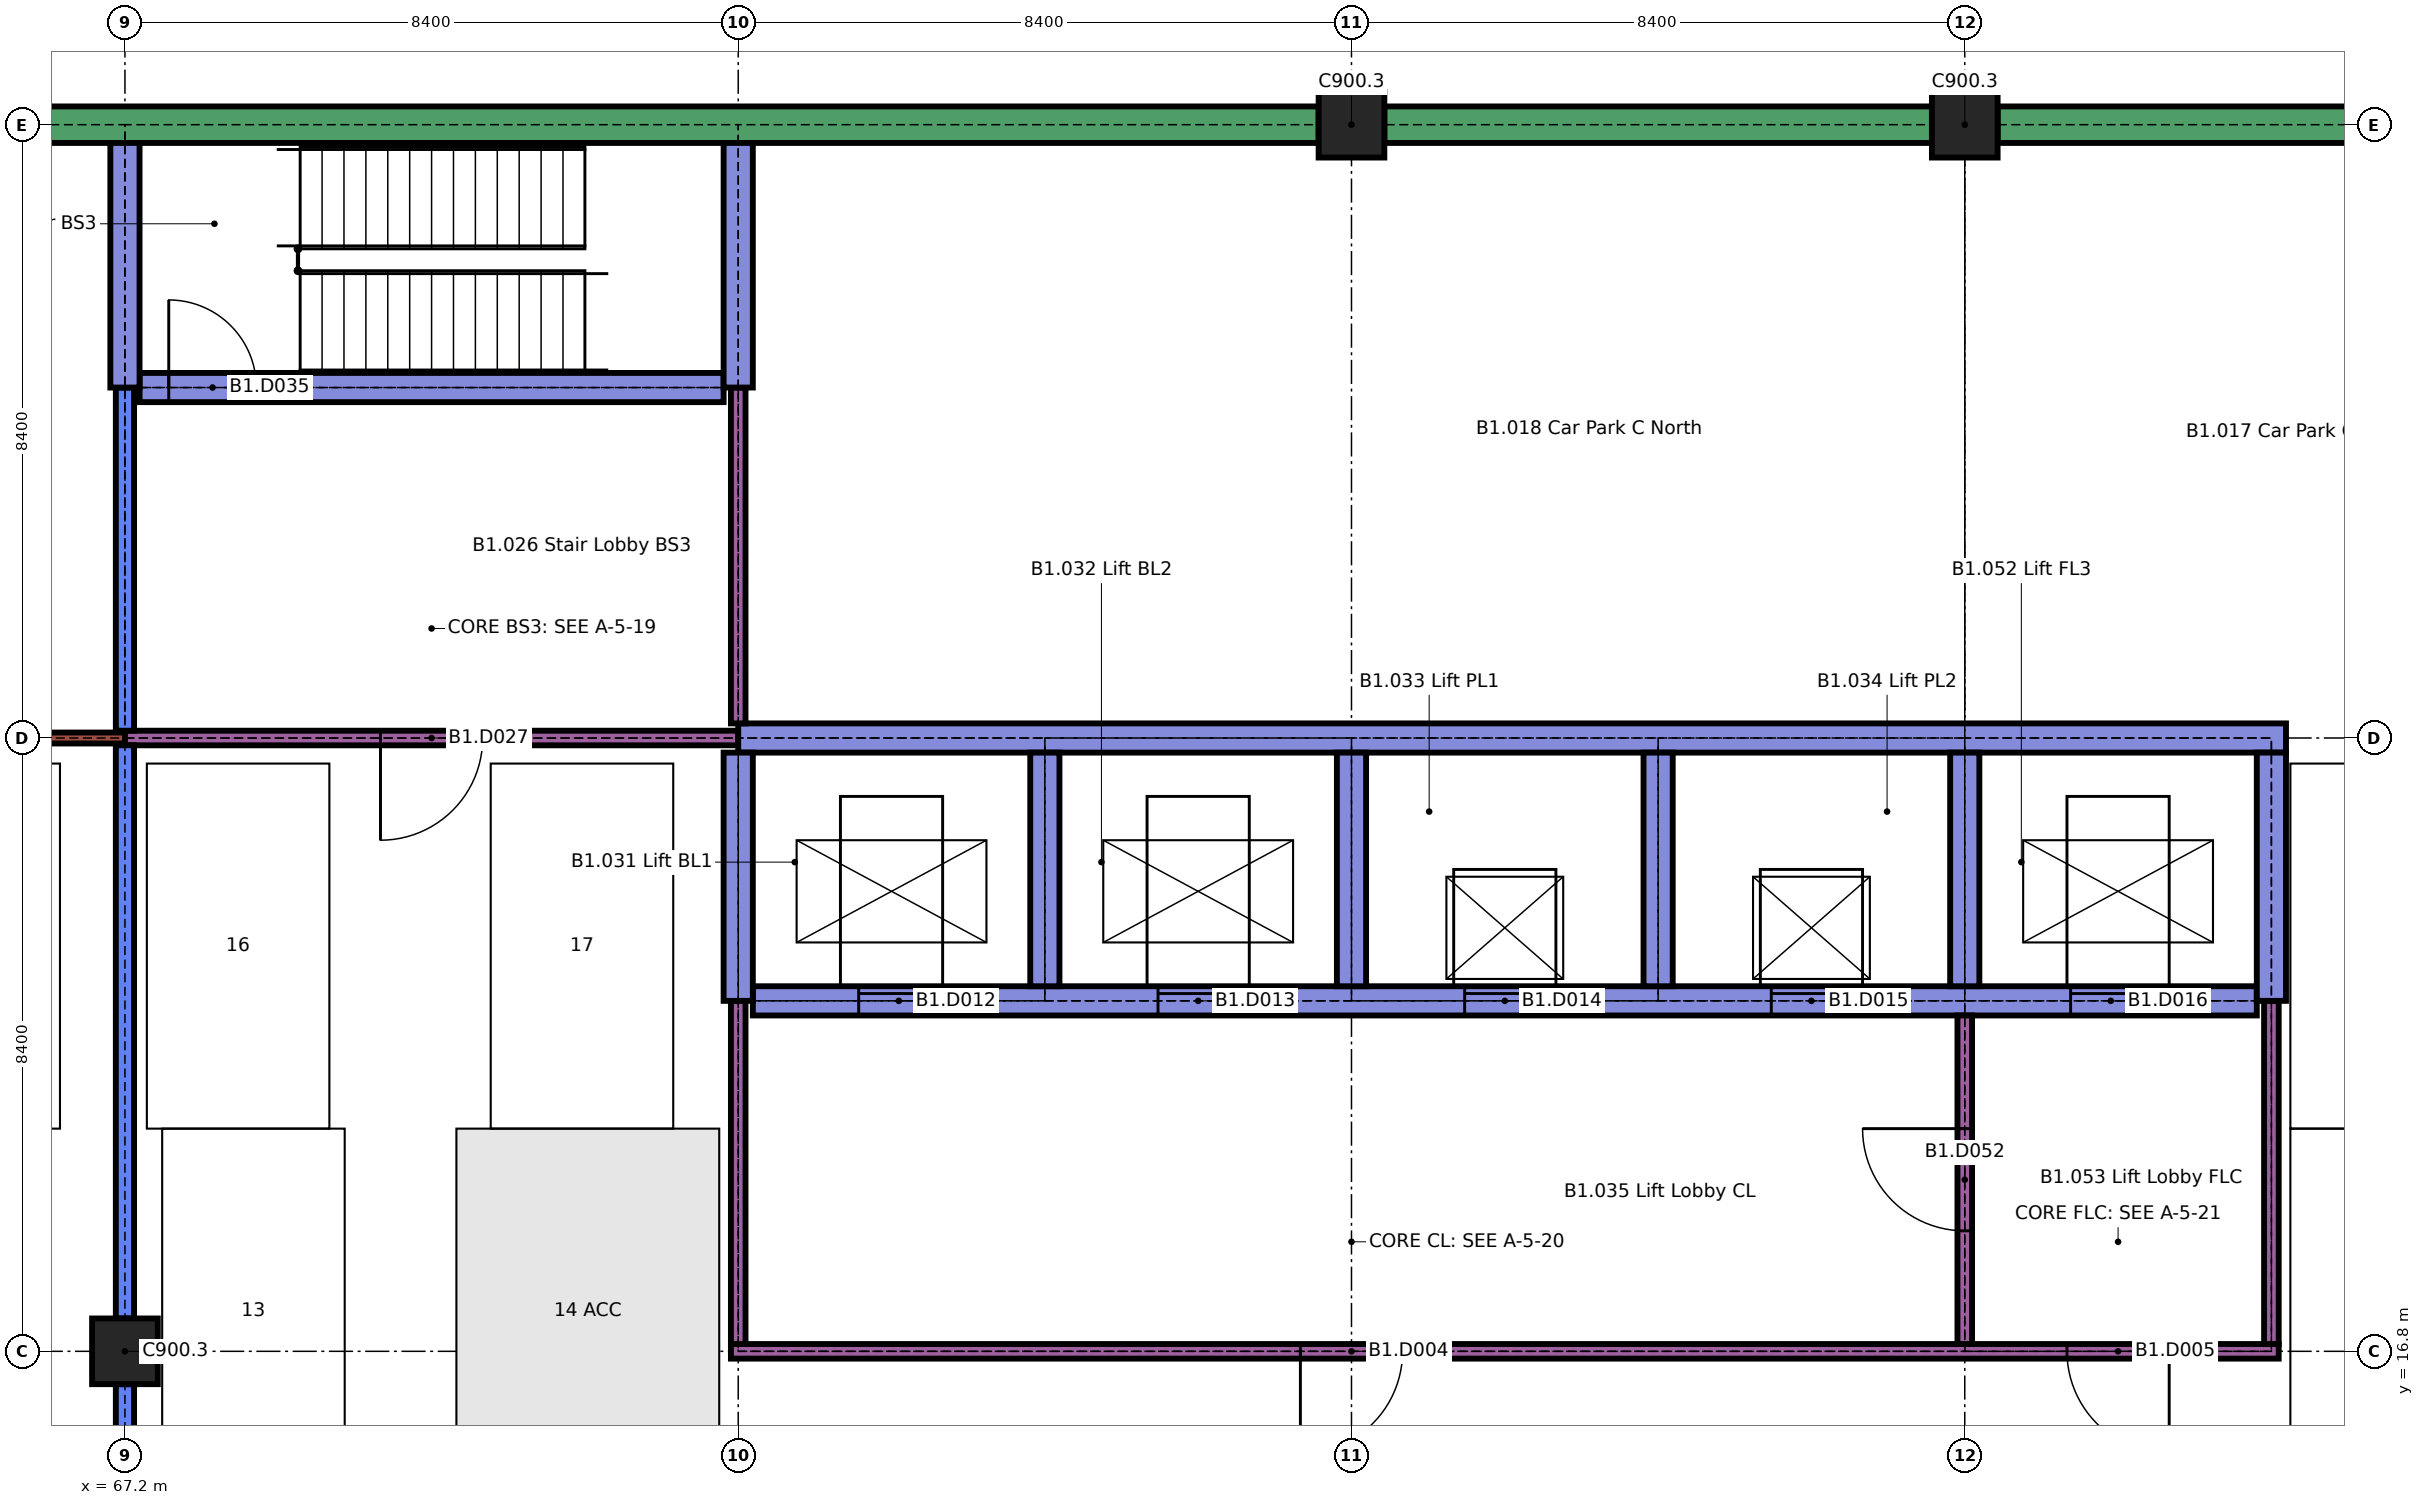
"""IFC4 building model, lengths in metres.
Left out: names, types, materials, properties, quantities, classifications, styles, units other than length and angle.
Written with IfcOpenShell. Run it as: python <this file> out.ifc"""

import sys

from ifc_helpers import new_model, si_unit, direction, frame, frame_2d, origin, origin_2d, place, context, subcontext, project, spatial, rectangle, extrude, element, fill, save


model = new_model("IFC4")
c1 = context("Model", 3, precision=1e-05, world=origin(), true_north=direction((0.0, 1.0)))
c2 = subcontext(c1, "Body", "Model", "MODEL_VIEW")
j1 = project(units=[si_unit("LENGTHUNIT", "METRE"), si_unit("PLANEANGLEUNIT", "RADIAN")], contexts=[c1])
p1 = place(None, origin())
s1 = spatial("IfcSite", under=j1, at=p1, CompositionType="ELEMENT")
p2 = place(p1, origin())
s2 = spatial("IfcBuilding", under=s1, at=p2, CompositionType="ELEMENT")
p3 = place(p2, frame((0.0, 0.0, -4.2)))
s3 = spatial("IfcBuildingStorey", under=s2, at=p3, CompositionType="ELEMENT", Elevation=-4.2)
for number, where, z_axis, x_axis in (
    (1, (67.2, 16.8, 0.0), (0.0, 0.0, 1.0), (1.0, 0.0, 0.0)),
    (2, (84.0, 33.6, 0.0), (0.0, 0.0, 1.0), (1.0, 0.0, 0.0)),
    (3, (92.4, 33.6, 0.0), (0.0, 0.0, 1.0), (1.0, 0.0, 0.0)),
):
    element("IfcColumn", number, at=place(p3, frame(where, z_axis=z_axis, x_axis=x_axis)), inside=s3, PredefinedType="COLUMN", context=c2, shape_type="SweptSolid", body=[
        extrude(rectangle(XDim=0.9, YDim=0.9, at=origin_2d()), origin(), (0.0, 0.0, 1.0), 3.75),
    ])
p4 = place(p3, frame((42.45, 33.6, 0.0), z_axis=(0.0, 0.0, 1.0), x_axis=(1.0, 0.0, 0.0)))
e4 = element("IfcWall", 4, at=p4, inside=s3, PredefinedType="SOLIDWALL", context=c2, shape_type="SweptSolid", body=[
    extrude(rectangle(XDim=41.1, YDim=0.5, at=frame_2d((20.55, 0.0))), origin(), (0.0, 0.0, 1.0), 3.75),
])
for number, where, z_axis, x_axis in (
    (5, (84.45, 33.6, 0.0), (0.0, 0.0, 1.0), (1.0, 0.0, 0.0)),
    (6, (92.85, 33.6, 0.0), (0.0, 0.0, 1.0), (1.0, 0.0, 0.0)),
):
    element("IfcWall", number, at=place(p3, frame(where, z_axis=z_axis, x_axis=x_axis)), inside=s3, PredefinedType="SOLIDWALL", context=c2, shape_type="SweptSolid", body=[
        extrude(rectangle(XDim=7.5, YDim=0.5, at=frame_2d((3.75, 0.0))), origin(), (0.0, 0.0, 1.0), 3.75),
    ])
p5 = place(p3, frame((75.5, 16.8, 0.0), z_axis=(0.0, 0.0, 1.0), x_axis=(1.0, 0.0, 0.0)))
e7 = element("IfcWall", 7, at=p5, inside=s3, PredefinedType="PARTITIONING", context=c2, shape_type="SweptSolid", body=[
    extrude(rectangle(XDim=21.2, YDim=0.2, at=frame_2d((10.6, 0.0))), origin(), (0.0, 0.0, 1.0), 3.75),
])
p6 = place(p5, frame((7.8, 0.0, 0.0)))
e8 = element("IfcOpeningElement", 8, at=p6, cuts=e7, PredefinedType="OPENING", context=c2, shape_type="SweptSolid", body=[
    extrude(rectangle(XDim=1.4, YDim=2.1, at=frame_2d((0.7, 1.05))), frame((0.0, 0.11, 0.0), z_axis=(0.0, -1.0, 0.0), x_axis=(1.0, 0.0, 0.0)), (0.0, 0.0, 1.0), 0.22),
])
p7 = place(p5, frame((18.3, 0.0, 0.0)))
e9 = element("IfcOpeningElement", 9, at=p7, cuts=e7, PredefinedType="OPENING", context=c2, shape_type="SweptSolid", body=[
    extrude(rectangle(XDim=1.4, YDim=2.1, at=frame_2d((0.7, 1.05))), frame((0.0, 0.11, 0.0), z_axis=(0.0, -1.0, 0.0), x_axis=(1.0, 0.0, 0.0)), (0.0, 0.0, 1.0), 0.22),
])
p8 = place(p3, frame((75.8, 21.6, 0.0), z_axis=(0.0, 0.0, 1.0), x_axis=(1.0, 0.0, 0.0)))
e10 = element("IfcWall", 10, at=p8, inside=s3, PredefinedType="SHEAR", context=c2, shape_type="SweptSolid", body=[
    extrude(rectangle(XDim=20.6, YDim=0.4, at=frame_2d((10.3, 0.0))), origin(), (0.0, 0.0, 1.0), 3.75),
])
p9 = place(p8, frame((1.45, 0.0, 0.0)))
e11 = element("IfcOpeningElement", 11, at=p9, cuts=e10, PredefinedType="OPENING", context=c2, shape_type="SweptSolid", body=[
    extrude(rectangle(XDim=1.1, YDim=2.1, at=frame_2d((0.55, 1.05))), frame((0.0, 0.21, 0.0), z_axis=(0.0, -1.0, 0.0), x_axis=(1.0, 0.0, 0.0)), (0.0, 0.0, 1.0), 0.42),
])
p10 = place(p8, frame((5.55, 0.0, 0.0)))
e12 = element("IfcOpeningElement", 12, at=p10, cuts=e10, PredefinedType="OPENING", context=c2, shape_type="SweptSolid", body=[
    extrude(rectangle(XDim=1.1, YDim=2.1, at=frame_2d((0.55, 1.05))), frame((0.0, 0.21, 0.0), z_axis=(0.0, -1.0, 0.0), x_axis=(1.0, 0.0, 0.0)), (0.0, 0.0, 1.0), 0.42),
])
p11 = place(p8, frame((9.75, 0.0, 0.0)))
e13 = element("IfcOpeningElement", 13, at=p11, cuts=e10, PredefinedType="OPENING", context=c2, shape_type="SweptSolid", body=[
    extrude(rectangle(XDim=1.1, YDim=2.1, at=frame_2d((0.55, 1.05))), frame((0.0, 0.21, 0.0), z_axis=(0.0, -1.0, 0.0), x_axis=(1.0, 0.0, 0.0)), (0.0, 0.0, 1.0), 0.42),
])
p12 = place(p8, frame((13.95, 0.0, 0.0)))
e14 = element("IfcOpeningElement", 14, at=p12, cuts=e10, PredefinedType="OPENING", context=c2, shape_type="SweptSolid", body=[
    extrude(rectangle(XDim=1.1, YDim=2.1, at=frame_2d((0.55, 1.05))), frame((0.0, 0.21, 0.0), z_axis=(0.0, -1.0, 0.0), x_axis=(1.0, 0.0, 0.0)), (0.0, 0.0, 1.0), 0.42),
])
p13 = place(p8, frame((18.05, 0.0, 0.0)))
e15 = element("IfcOpeningElement", 15, at=p13, cuts=e10, PredefinedType="OPENING", context=c2, shape_type="SweptSolid", body=[
    extrude(rectangle(XDim=1.1, YDim=2.1, at=frame_2d((0.55, 1.05))), frame((0.0, 0.21, 0.0), z_axis=(0.0, -1.0, 0.0), x_axis=(1.0, 0.0, 0.0)), (0.0, 0.0, 1.0), 0.42),
])
p14 = place(p3, frame((58.8, 25.2, 0.0), z_axis=(0.0, 0.0, 1.0), x_axis=(1.0, 0.0, 0.0)))
e16 = element("IfcWall", 16, at=p14, inside=s3, PredefinedType="PARTITIONING", context=c2, shape_type="SweptSolid", body=[
    extrude(rectangle(XDim=8.4, YDim=0.15, at=frame_2d((4.2, 0.0))), origin(), (0.0, 0.0, 1.0), 3.75),
])
p15 = place(p14, frame((3.5, 0.0, 0.0)))
e17 = element("IfcOpeningElement", 17, at=p15, cuts=e16, PredefinedType="OPENING", context=c2, shape_type="SweptSolid", body=[
    extrude(rectangle(XDim=1.4, YDim=2.1, at=frame_2d((0.7, 1.05))), frame((0.0, 0.085, 0.0), z_axis=(0.0, -1.0, 0.0), x_axis=(1.0, 0.0, 0.0)), (0.0, 0.0, 1.0), 0.17),
])
p16 = place(p3, frame((67.2, 25.2, 0.0), z_axis=(0.0, 0.0, 1.0), x_axis=(1.0, 0.0, 0.0)))
e18 = element("IfcWall", 18, at=p16, inside=s3, PredefinedType="PARTITIONING", context=c2, shape_type="SweptSolid", body=[
    extrude(rectangle(XDim=8.4, YDim=0.2, at=frame_2d((4.2, 0.0))), origin(), (0.0, 0.0, 1.0), 3.75),
])
p17 = place(p16, frame((3.5, 0.0, 0.0)))
e19 = element("IfcOpeningElement", 19, at=p17, cuts=e18, PredefinedType="OPENING", context=c2, shape_type="SweptSolid", body=[
    extrude(rectangle(XDim=1.4, YDim=2.1, at=frame_2d((0.7, 1.05))), frame((0.0, 0.11, 0.0), z_axis=(0.0, -1.0, 0.0), x_axis=(1.0, 0.0, 0.0)), (0.0, 0.0, 1.0), 0.22),
])
p18 = place(p3, frame((75.6, 25.2, 0.0), z_axis=(0.0, 0.0, 1.0), x_axis=(1.0, 0.0, 0.0)))
e20 = element("IfcWall", 20, at=p18, inside=s3, PredefinedType="SHEAR", context=c2, shape_type="SweptSolid", body=[
    extrude(rectangle(XDim=21.2, YDim=0.4, at=frame_2d((10.6, 0.0))), origin(), (0.0, 0.0, 1.0), 3.75),
])
p19 = place(p3, frame((67.4, 30.0, 0.0), z_axis=(0.0, 0.0, 1.0), x_axis=(1.0, 0.0, 0.0)))
e21 = element("IfcWall", 21, at=p19, inside=s3, PredefinedType="SHEAR", context=c2, shape_type="SweptSolid", body=[
    extrude(rectangle(XDim=8.0, YDim=0.4, at=frame_2d((4.0, 0.0))), origin(), (0.0, 0.0, 1.0), 3.75),
])
p20 = place(p19, frame((0.4, 0.0, 0.0)))
e22 = element("IfcOpeningElement", 22, at=p20, cuts=e21, PredefinedType="OPENING", context=c2, shape_type="SweptSolid", body=[
    extrude(rectangle(XDim=1.2, YDim=2.1, at=frame_2d((0.6, 1.05))), frame((0.0, 0.21, 0.0), z_axis=(0.0, -1.0, 0.0), x_axis=(1.0, 0.0, 0.0)), (0.0, 0.0, 1.0), 0.42),
])
p21 = place(p3, frame((67.2, 8.85, 0.0), z_axis=(0.0, 0.0, 1.0), x_axis=(0.0, 1.0, 0.0)))
e23 = element("IfcWall", 23, at=p21, inside=s3, PredefinedType="SOLIDWALL", context=c2, shape_type="SweptSolid", body=[
    extrude(rectangle(XDim=7.5, YDim=0.25, at=frame_2d((3.75, 0.0))), origin(), (0.0, 0.0, 1.0), 3.75),
])
p22 = place(p21, frame((0.3, 0.0, 0.0)))
e24 = element("IfcOpeningElement", 24, at=p22, cuts=e23, PredefinedType="OPENING", context=c2, shape_type="SweptSolid", body=[
    extrude(rectangle(XDim=6.0, YDim=2.5, at=frame_2d((3.0, 1.25))), frame((0.0, 0.135, 0.0), z_axis=(0.0, -1.0, 0.0), x_axis=(1.0, 0.0, 0.0)), (0.0, 0.0, 1.0), 0.27),
])
p23 = place(p3, frame((67.2, 17.25, 0.0), z_axis=(0.0, 0.0, 1.0), x_axis=(0.0, 1.0, 0.0)))
e25 = element("IfcWall", 25, at=p23, inside=s3, PredefinedType="SOLIDWALL", context=c2, shape_type="SweptSolid", body=[
    extrude(rectangle(XDim=7.85, YDim=0.25, at=frame_2d((3.925, 0.0))), origin(), (0.0, 0.0, 1.0), 3.75),
])
p24 = place(p3, frame((67.2, 25.3, 0.0), z_axis=(0.0, 0.0, 1.0), x_axis=(0.0, 1.0, 0.0)))
e26 = element("IfcWall", 26, at=p24, inside=s3, PredefinedType="SOLIDWALL", context=c2, shape_type="SweptSolid", body=[
    extrude(rectangle(XDim=4.7, YDim=0.25, at=frame_2d((2.35, 0.0))), origin(), (0.0, 0.0, 1.0), 3.75),
])
p25 = place(p3, frame((67.2, 30.0, 0.0), z_axis=(0.0, 0.0, 1.0), x_axis=(0.0, 1.0, 0.0)))
e27 = element("IfcWall", 27, at=p25, inside=s3, PredefinedType="SHEAR", context=c2, shape_type="SweptSolid", body=[
    extrude(rectangle(XDim=3.35, YDim=0.4, at=frame_2d((1.675, 0.0))), origin(), (0.0, 0.0, 1.0), 3.75),
])
p26 = place(p3, frame((75.6, 16.9, 0.0), z_axis=(0.0, 0.0, 1.0), x_axis=(0.0, 1.0, 0.0)))
e28 = element("IfcWall", 28, at=p26, inside=s3, PredefinedType="PARTITIONING", context=c2, shape_type="SweptSolid", body=[
    extrude(rectangle(XDim=4.7, YDim=0.2, at=frame_2d((2.35, 0.0))), origin(), (0.0, 0.0, 1.0), 3.75),
])
p27 = place(p3, frame((75.6, 21.6, 0.0), z_axis=(0.0, 0.0, 1.0), x_axis=(0.0, 1.0, 0.0)))
e29 = element("IfcWall", 29, at=p27, inside=s3, PredefinedType="SHEAR", context=c2, shape_type="SweptSolid", body=[
    extrude(rectangle(XDim=3.4, YDim=0.4, at=frame_2d((1.7, 0.0))), origin(), (0.0, 0.0, 1.0), 3.75),
])
p28 = place(p3, frame((75.6, 25.4, 0.0), z_axis=(0.0, 0.0, 1.0), x_axis=(0.0, 1.0, 0.0)))
e30 = element("IfcWall", 30, at=p28, inside=s3, PredefinedType="PARTITIONING", context=c2, shape_type="SweptSolid", body=[
    extrude(rectangle(XDim=4.6, YDim=0.2, at=frame_2d((2.3, 0.0))), origin(), (0.0, 0.0, 1.0), 3.75),
])
p29 = place(p3, frame((75.6, 30.0, 0.0), z_axis=(0.0, 0.0, 1.0), x_axis=(0.0, 1.0, 0.0)))
e31 = element("IfcWall", 31, at=p29, inside=s3, PredefinedType="SHEAR", context=c2, shape_type="SweptSolid", body=[
    extrude(rectangle(XDim=3.35, YDim=0.4, at=frame_2d((1.675, 0.0))), origin(), (0.0, 0.0, 1.0), 3.75),
])
for number, where, z_axis, x_axis in (
    (32, (79.8, 21.8, 0.0), (0.0, 0.0, 1.0), (0.0, 1.0, 0.0)),
    (33, (84.0, 21.8, 0.0), (0.0, 0.0, 1.0), (0.0, 1.0, 0.0)),
    (34, (88.2, 21.8, 0.0), (0.0, 0.0, 1.0), (0.0, 1.0, 0.0)),
):
    element("IfcWall", number, at=place(p3, frame(where, z_axis=z_axis, x_axis=x_axis)), inside=s3, PredefinedType="SHEAR", context=c2, shape_type="SweptSolid", body=[
        extrude(rectangle(XDim=3.2, YDim=0.4, at=frame_2d((1.6, 0.0))), origin(), (0.0, 0.0, 1.0), 3.75),
    ])
p30 = place(p3, frame((92.4, 16.9, 0.0), z_axis=(0.0, 0.0, 1.0), x_axis=(0.0, 1.0, 0.0)))
e35 = element("IfcWall", 35, at=p30, inside=s3, PredefinedType="PARTITIONING", context=c2, shape_type="SweptSolid", body=[
    extrude(rectangle(XDim=4.5, YDim=0.2, at=frame_2d((2.25, 0.0))), origin(), (0.0, 0.0, 1.0), 3.75),
])
p31 = place(p30, frame((1.55, 0.0, 0.0)))
e36 = element("IfcOpeningElement", 36, at=p31, cuts=e35, PredefinedType="OPENING", context=c2, shape_type="SweptSolid", body=[
    extrude(rectangle(XDim=1.4, YDim=2.1, at=frame_2d((0.7, 1.05))), frame((0.0, 0.11, 0.0), z_axis=(0.0, -1.0, 0.0), x_axis=(1.0, 0.0, 0.0)), (0.0, 0.0, 1.0), 0.22),
])
p32 = place(p3, frame((92.4, 21.8, 0.0), z_axis=(0.0, 0.0, 1.0), x_axis=(0.0, 1.0, 0.0)))
e37 = element("IfcWall", 37, at=p32, inside=s3, PredefinedType="SHEAR", context=c2, shape_type="SweptSolid", body=[
    extrude(rectangle(XDim=3.2, YDim=0.4, at=frame_2d((1.6, 0.0))), origin(), (0.0, 0.0, 1.0), 3.75),
])
p33 = place(p3, frame((96.6, 16.9, 0.0), z_axis=(0.0, 0.0, 1.0), x_axis=(0.0, 1.0, 0.0)))
e38 = element("IfcWall", 38, at=p33, inside=s3, PredefinedType="PARTITIONING", context=c2, shape_type="SweptSolid", body=[
    extrude(rectangle(XDim=4.7, YDim=0.2, at=frame_2d((2.35, 0.0))), origin(), (0.0, 0.0, 1.0), 3.75),
])
p34 = place(p3, frame((96.6, 21.6, 0.0), z_axis=(0.0, 0.0, 1.0), x_axis=(0.0, 1.0, 0.0)))
e39 = element("IfcWall", 39, at=p34, inside=s3, PredefinedType="SHEAR", context=c2, shape_type="SweptSolid", body=[
    extrude(rectangle(XDim=3.4, YDim=0.4, at=frame_2d((1.7, 0.0))), origin(), (0.0, 0.0, 1.0), 3.75),
])
p35 = place(p6, origin())
e40 = element("IfcDoor", 40, at=p35, inside=s3, OperationType="SINGLE_SWING_LEFT", PredefinedType="DOOR", context=c2, shape_type="SweptSolid", body=[
    extrude(rectangle(XDim=1.4, YDim=2.1, at=frame_2d((0.7, 1.05))), frame((0.0, 0.025, 0.0), z_axis=(0.0, -1.0, 0.0), x_axis=(1.0, 0.0, 0.0)), (0.0, 0.0, 1.0), 0.05),
])
fill(e8, e40)
p36 = place(p7, origin())
e41 = element("IfcDoor", 41, at=p36, inside=s3, OperationType="SINGLE_SWING_RIGHT", PredefinedType="DOOR", context=c2, shape_type="SweptSolid", body=[
    extrude(rectangle(XDim=1.4, YDim=2.1, at=frame_2d((0.7, 1.05))), frame((0.0, 0.025, 0.0), z_axis=(0.0, -1.0, 0.0), x_axis=(1.0, 0.0, 0.0)), (0.0, 0.0, 1.0), 0.05),
])
fill(e9, e41)
p37 = place(p9, origin())
e42 = element("IfcDoor", 42, at=p37, inside=s3, OperationType="SLIDING_TO_LEFT", PredefinedType="DOOR", context=c2, shape_type="SweptSolid", body=[
    extrude(rectangle(XDim=1.1, YDim=2.1, at=frame_2d((0.55, 1.05))), frame((0.0, 0.025, 0.0), z_axis=(0.0, -1.0, 0.0), x_axis=(1.0, 0.0, 0.0)), (0.0, 0.0, 1.0), 0.05),
])
fill(e11, e42)
p38 = place(p10, origin())
e43 = element("IfcDoor", 43, at=p38, inside=s3, OperationType="SLIDING_TO_LEFT", PredefinedType="DOOR", context=c2, shape_type="SweptSolid", body=[
    extrude(rectangle(XDim=1.1, YDim=2.1, at=frame_2d((0.55, 1.05))), frame((0.0, 0.025, 0.0), z_axis=(0.0, -1.0, 0.0), x_axis=(1.0, 0.0, 0.0)), (0.0, 0.0, 1.0), 0.05),
])
fill(e12, e43)
p39 = place(p11, origin())
e44 = element("IfcDoor", 44, at=p39, inside=s3, OperationType="SLIDING_TO_LEFT", PredefinedType="DOOR", context=c2, shape_type="SweptSolid", body=[
    extrude(rectangle(XDim=1.1, YDim=2.1, at=frame_2d((0.55, 1.05))), frame((0.0, 0.025, 0.0), z_axis=(0.0, -1.0, 0.0), x_axis=(1.0, 0.0, 0.0)), (0.0, 0.0, 1.0), 0.05),
])
fill(e13, e44)
p40 = place(p12, origin())
e45 = element("IfcDoor", 45, at=p40, inside=s3, OperationType="SLIDING_TO_LEFT", PredefinedType="DOOR", context=c2, shape_type="SweptSolid", body=[
    extrude(rectangle(XDim=1.1, YDim=2.1, at=frame_2d((0.55, 1.05))), frame((0.0, 0.025, 0.0), z_axis=(0.0, -1.0, 0.0), x_axis=(1.0, 0.0, 0.0)), (0.0, 0.0, 1.0), 0.05),
])
fill(e14, e45)
p41 = place(p13, origin())
e46 = element("IfcDoor", 46, at=p41, inside=s3, OperationType="SLIDING_TO_LEFT", PredefinedType="DOOR", context=c2, shape_type="SweptSolid", body=[
    extrude(rectangle(XDim=1.1, YDim=2.1, at=frame_2d((0.55, 1.05))), frame((0.0, 0.025, 0.0), z_axis=(0.0, -1.0, 0.0), x_axis=(1.0, 0.0, 0.0)), (0.0, 0.0, 1.0), 0.05),
])
fill(e15, e46)
p42 = place(p17, origin())
e47 = element("IfcDoor", 47, at=p42, inside=s3, OperationType="SINGLE_SWING_LEFT", PredefinedType="DOOR", context=c2, shape_type="SweptSolid", body=[
    extrude(rectangle(XDim=1.4, YDim=2.1, at=frame_2d((0.7, 1.05))), frame((0.0, 0.025, 0.0), z_axis=(0.0, -1.0, 0.0), x_axis=(1.0, 0.0, 0.0)), (0.0, 0.0, 1.0), 0.05),
])
fill(e19, e47)
p43 = place(p20, origin())
e48 = element("IfcDoor", 48, at=p43, inside=s3, OperationType="SINGLE_SWING_RIGHT", PredefinedType="DOOR", context=c2, shape_type="SweptSolid", body=[
    extrude(rectangle(XDim=1.2, YDim=2.1, at=frame_2d((0.6, 1.05))), frame((0.0, 0.025, 0.0), z_axis=(0.0, -1.0, 0.0), x_axis=(1.0, 0.0, 0.0)), (0.0, 0.0, 1.0), 0.05),
])
fill(e22, e48)
p44 = place(p31, origin())
e49 = element("IfcDoor", 49, at=p44, inside=s3, OperationType="SINGLE_SWING_LEFT", PredefinedType="DOOR", context=c2, shape_type="SweptSolid", body=[
    extrude(rectangle(XDim=1.4, YDim=2.1, at=frame_2d((0.7, 1.05))), frame((0.0, 0.025, 0.0), z_axis=(0.0, -1.0, 0.0), x_axis=(1.0, 0.0, 0.0)), (0.0, 0.0, 1.0), 0.05),
])
fill(e36, e49)
save(model, sys.argv[1])
